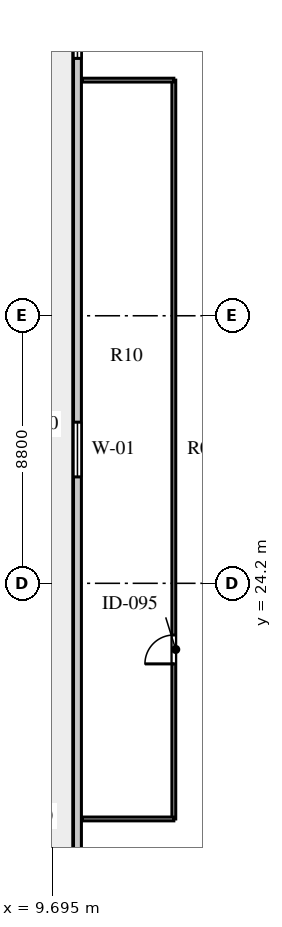
"""IFC4 building model, lengths in metres.
Left out: names, types, materials, properties, quantities, classifications, styles, units other than length and angle.
Written with IfcOpenShell. Run it as: python <this file> out.ifc"""

import sys

from ifc_helpers import new_model, si_unit, direction, frame, frame_2d, origin, place, context, subcontext, project, spatial, rectangle, extrude, element, fill, save


model = new_model("IFC4")
c1 = context("Model", 3, precision=1e-05, world=origin(), true_north=direction((0.0, 1.0)))
c2 = subcontext(c1, "Body", "Model", "MODEL_VIEW")
j1 = project(units=[si_unit("LENGTHUNIT", "METRE"), si_unit("PLANEANGLEUNIT", "RADIAN")], contexts=[c1])
p1 = place(None, origin())
s1 = spatial("IfcSite", under=j1, at=p1, CompositionType="ELEMENT")
p2 = place(p1, origin())
s2 = spatial("IfcBuilding", under=s1, at=p2, CompositionType="ELEMENT")
p3 = place(p2, frame((0.0, 0.0, 280.4)))
s3 = spatial("IfcBuildingStorey", under=s2, at=p3, CompositionType="ELEMENT", Elevation=280.4)
p4 = place(p3, frame((10.53, 43.79, 0.0), z_axis=(0.0, 0.0, 1.0), x_axis=(0.0, -1.0, 0.0)))
e1 = element("IfcWall", 1, at=p4, inside=s3, PredefinedType="SOLIDWALL", context=c2, shape_type="SweptSolid", body=[
    extrude(rectangle(XDim=30.38, YDim=0.26, at=frame_2d((15.19, 0.0))), origin(), (0.0, 0.0, 1.0), 3.66),
])
p5 = place(p4, frame((28.69, 0.0, 0.0)))
e2 = element("IfcOpeningElement", 2, at=p5, cuts=e1, PredefinedType="OPENING", context=c2, shape_type="SweptSolid", body=[
    extrude(rectangle(XDim=1.0, YDim=2.05, at=frame_2d((0.5, 1.025))), frame((0.0, 0.14, 0.0), z_axis=(0.0, -1.0, 0.0), x_axis=(1.0, 0.0, 0.0)), (0.0, 0.0, 1.0), 0.28),
])
p6 = place(p4, frame((14.29, 0.0, 0.8)))
e3 = element("IfcOpeningElement", 3, at=p6, cuts=e1, PredefinedType="OPENING", context=c2, shape_type="SweptSolid", body=[
    extrude(rectangle(XDim=1.8, YDim=2.0, at=frame_2d((0.9, 1.0))), frame((0.0, 0.14, 0.0), z_axis=(0.0, -1.0, 0.0), x_axis=(1.0, 0.0, 0.0)), (0.0, 0.0, 1.0), 0.28),
])
p7 = place(p4, frame((0.825, 0.0, 0.8)))
e4 = element("IfcOpeningElement", 4, at=p7, cuts=e1, PredefinedType="OPENING", context=c2, shape_type="SweptSolid", body=[
    extrude(rectangle(XDim=1.5, YDim=2.0, at=frame_2d((0.75, 1.0))), frame((0.0, 0.14, 0.0), z_axis=(0.0, -1.0, 0.0), x_axis=(1.0, 0.0, 0.0)), (0.0, 0.0, 1.0), 0.28),
])
p8 = place(p3, frame((13.7, 16.45, 0.0), z_axis=(0.0, 0.0, 1.0), x_axis=(0.0, 1.0, 0.0)))
e5 = element("IfcWall", 5, at=p8, inside=s3, PredefinedType="PLUMBINGWALL", context=c2, shape_type="SweptSolid", body=[
    extrude(rectangle(XDim=24.3, YDim=0.125, at=frame_2d((12.15, 0.0))), origin(), (0.0, 0.0, 1.0), 3.66),
])
p9 = place(p8, frame((5.1, 0.0, 0.0)))
e6 = element("IfcOpeningElement", 6, at=p9, cuts=e5, PredefinedType="OPENING", context=c2, shape_type="SweptSolid", body=[
    extrude(rectangle(XDim=0.95, YDim=2.08, at=frame_2d((0.475, 1.04))), frame((0.0, 0.073, 0.0), z_axis=(0.0, -1.0, 0.0), x_axis=(1.0, 0.0, 0.0)), (0.0, 0.0, 1.0), 0.145),
])
for number, where, z_axis, x_axis in (
    (7, (10.68, 16.45, 0.0), (0.0, 0.0, 1.0), (1.0, 0.0, 0.0)),
    (8, (10.68, 40.75, 0.0), (0.0, 0.0, 1.0), (1.0, 0.0, 0.0)),
):
    element("IfcWall", number, at=place(p3, frame(where, z_axis=z_axis, x_axis=x_axis)), inside=s3, PredefinedType="PLUMBINGWALL", context=c2, shape_type="SweptSolid", body=[
        extrude(rectangle(XDim=3.02, YDim=0.125, at=frame_2d((1.51, 0.0))), origin(), (0.0, 0.0, 1.0), 3.66),
    ])
p10 = place(p6, origin())
e9 = element("IfcWindow", 9, at=p10, inside=s3, PartitioningType="SINGLE_PANEL", PredefinedType="WINDOW", context=c2, shape_type="SweptSolid", body=[
    extrude(rectangle(XDim=1.8, YDim=2.0, at=frame_2d((0.9, 1.0))), frame((0.0, 0.03, 0.0), z_axis=(0.0, -1.0, 0.0), x_axis=(1.0, 0.0, 0.0)), (0.0, 0.0, 1.0), 0.06),
])
fill(e3, e9)
p11 = place(p7, origin())
e10 = element("IfcWindow", 10, at=p11, inside=s3, PartitioningType="SINGLE_PANEL", PredefinedType="WINDOW", context=c2, shape_type="SweptSolid", body=[
    extrude(rectangle(XDim=1.5, YDim=2.0, at=frame_2d((0.75, 1.0))), frame((0.0, 0.03, 0.0), z_axis=(0.0, -1.0, 0.0), x_axis=(1.0, 0.0, 0.0)), (0.0, 0.0, 1.0), 0.06),
])
fill(e4, e10)
p12 = place(p9, origin())
e11 = element("IfcDoor", 11, at=p12, inside=s3, OperationType="SINGLE_SWING_LEFT", PredefinedType="DOOR", context=c2, shape_type="SweptSolid", body=[
    extrude(rectangle(XDim=0.95, YDim=2.08, at=frame_2d((0.475, 1.04))), frame((0.0, 0.025, 0.0), z_axis=(0.0, -1.0, 0.0), x_axis=(1.0, 0.0, 0.0)), (0.0, 0.0, 1.0), 0.05),
])
fill(e6, e11)
save(model, sys.argv[1])
